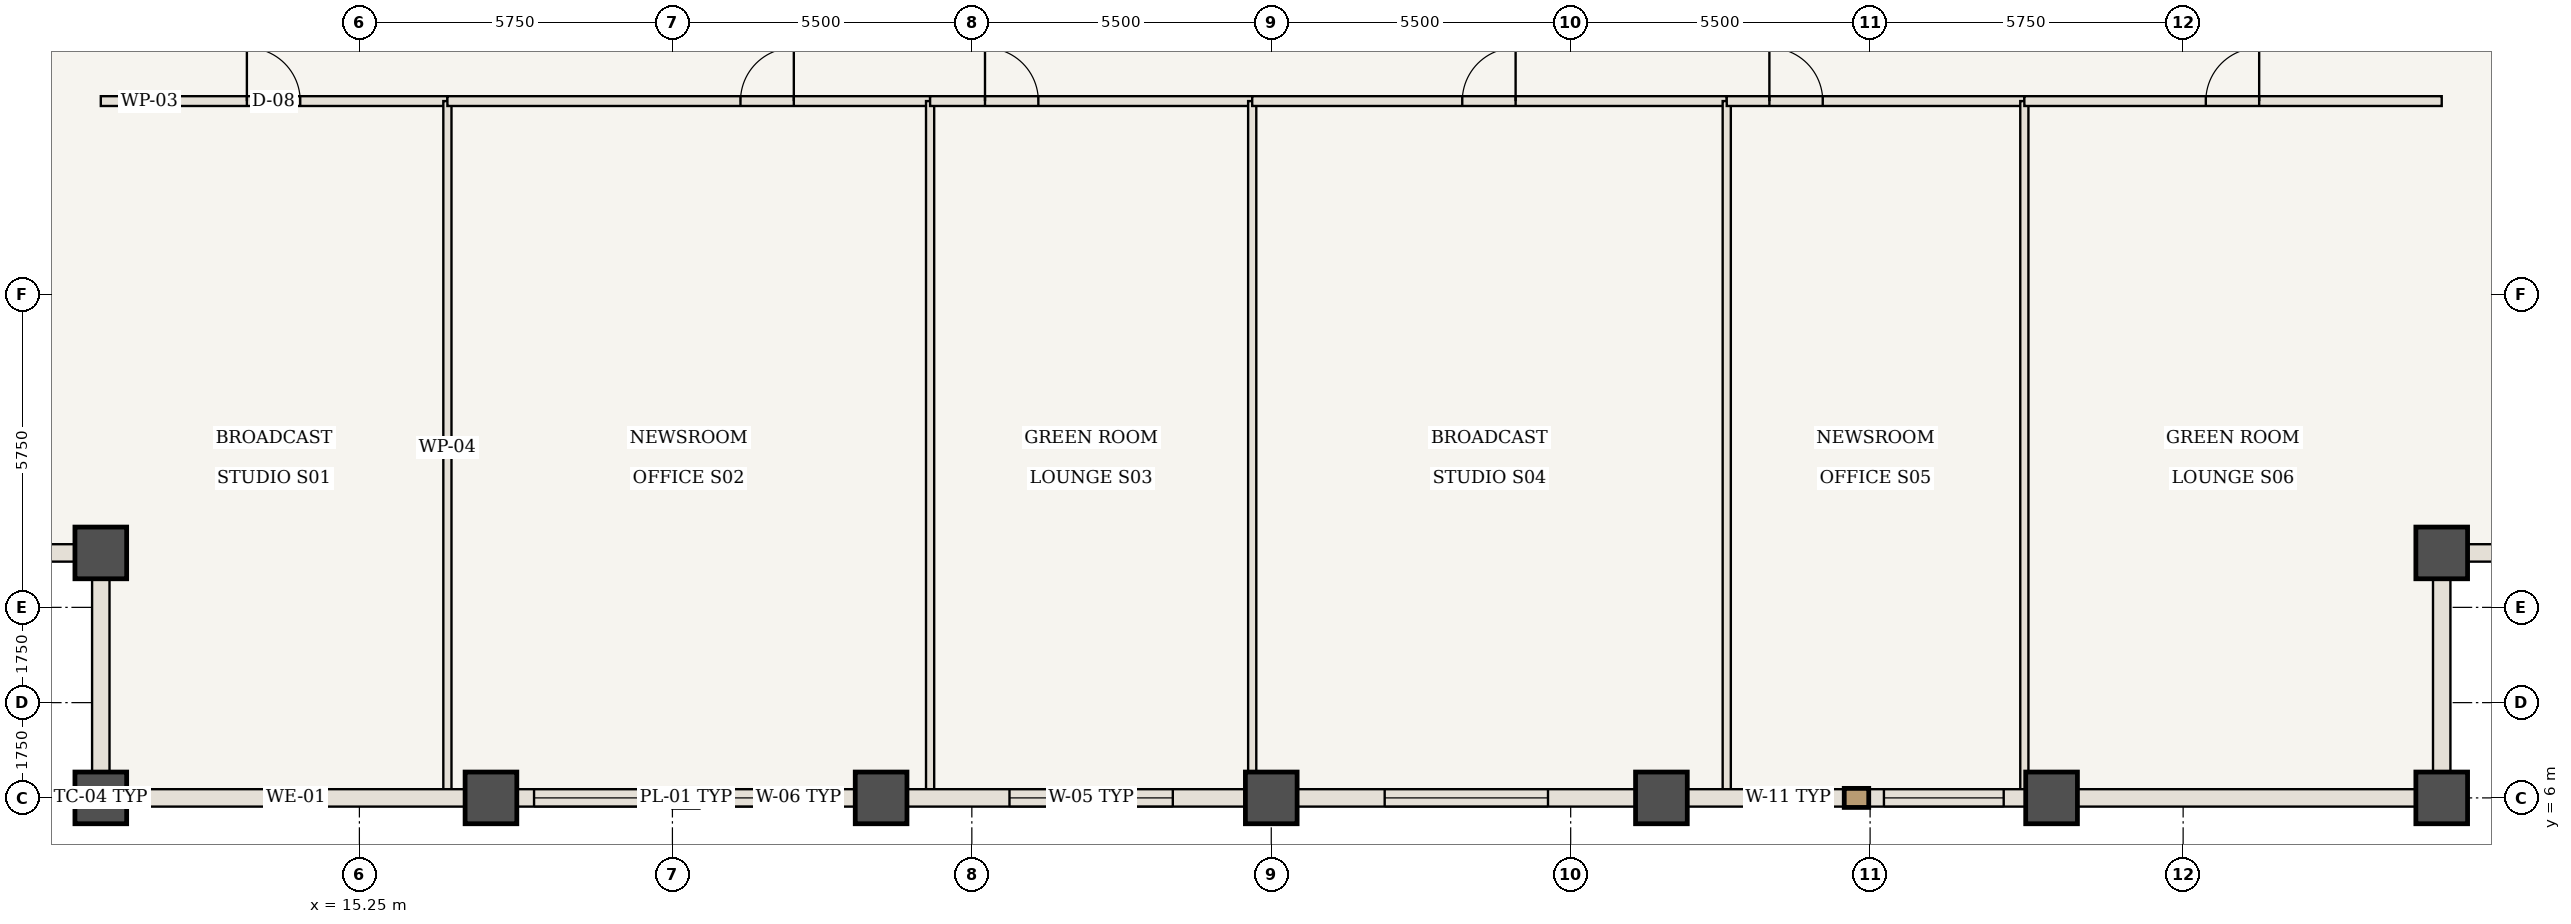
"""IFC4 building model, lengths in metres.
Left out: names, types, materials, properties, quantities, classifications, styles, units other than length and angle.
Written with IfcOpenShell. Run it as: python <this file> out.ifc"""

import sys

from ifc_helpers import new_model, si_unit, direction, frame, frame_2d, origin, origin_2d, place, context, subcontext, project, spatial, rectangle, extrude, element, fill, save


model = new_model("IFC4")
c1 = context("Model", 3, precision=1e-05, world=origin(), true_north=direction((0.0, 1.0)))
c2 = subcontext(c1, "Body", "Model", "MODEL_VIEW")
j1 = project(units=[si_unit("LENGTHUNIT", "METRE"), si_unit("PLANEANGLEUNIT", "RADIAN")], contexts=[c1])
p1 = place(None, origin())
s1 = spatial("IfcSite", under=j1, at=p1, CompositionType="ELEMENT")
p2 = place(p1, origin())
s2 = spatial("IfcBuilding", under=s1, at=p2, CompositionType="ELEMENT")
p3 = place(p2, frame((0.0, 0.0, 156.8)))
s3 = spatial("IfcBuildingStorey", under=s2, at=p3, CompositionType="ELEMENT", Elevation=156.8)
for number, where, z_axis, x_axis in (
    (1, (10.5, 6.0, 0.0), (0.0, 0.0, 1.0), (1.0, 0.0, 0.0)),
    (2, (10.5, 10.5, 0.0), (0.0, 0.0, 1.0), (1.0, 0.0, 0.0)),
    (3, (53.5, 6.0, 0.0), (0.0, 0.0, 1.0), (1.0, 0.0, 0.0)),
    (4, (53.5, 10.5, 0.0), (0.0, 0.0, 1.0), (1.0, 0.0, 0.0)),
    (5, (17.667, 6.0, 0.0), (0.0, 0.0, 1.0), (1.0, 0.0, 0.0)),
    (6, (24.833, 6.0, 0.0), (0.0, 0.0, 1.0), (1.0, 0.0, 0.0)),
    (7, (32.0, 6.0, 0.0), (0.0, 0.0, 1.0), (1.0, 0.0, 0.0)),
    (8, (39.167, 6.0, 0.0), (0.0, 0.0, 1.0), (1.0, 0.0, 0.0)),
    (9, (46.333, 6.0, 0.0), (0.0, 0.0, 1.0), (1.0, 0.0, 0.0)),
):
    element("IfcColumn", number, at=place(p3, frame(where, z_axis=z_axis, x_axis=x_axis)), inside=s3, PredefinedType="COLUMN", context=c2, shape_type="SweptSolid", body=[
        extrude(rectangle(XDim=0.95, YDim=0.95, at=origin_2d()), origin(), (0.0, 0.0, 1.0), 3.85),
    ])
p4 = place(p3, frame((10.5, 18.8, 0.0), z_axis=(0.0, 0.0, 1.0), x_axis=(1.0, 0.0, 0.0)))
e10 = element("IfcWall", 10, at=p4, inside=s3, PredefinedType="STANDARD", context=c2, shape_type="SweptSolid", body=[
    extrude(rectangle(XDim=6.367, YDim=0.18, at=frame_2d((3.183, 0.0))), origin(), (0.0, 0.0, 1.0), 3.685),
])
p5 = place(p4, frame((2.683, 0.0, 0.0)))
e11 = element("IfcOpeningElement", 11, at=p5, cuts=e10, PredefinedType="OPENING", context=c2, shape_type="SweptSolid", body=[
    extrude(rectangle(XDim=0.98, YDim=2.2, at=frame_2d((0.49, 1.1))), frame((0.0, 0.1, 0.0), z_axis=(0.0, -1.0, 0.0), x_axis=(1.0, 0.0, 0.0)), (0.0, 0.0, 1.0), 0.2),
])
p6 = place(p3, frame((16.867, 6.06, 0.0), z_axis=(0.0, 0.0, 1.0), x_axis=(0.0, 1.0, 0.0)))
e12 = element("IfcWall", 12, at=p6, inside=s3, PredefinedType="STANDARD", context=c2, shape_type="SweptSolid", body=[
    extrude(rectangle(XDim=12.74, YDim=0.15, at=frame_2d((6.37, 0.0))), origin(), (0.0, 0.0, 1.0), 3.685),
])
p7 = place(p3, frame((16.867, 18.8, 0.0), z_axis=(0.0, 0.0, 1.0), x_axis=(1.0, 0.0, 0.0)))
e13 = element("IfcWall", 13, at=p7, inside=s3, PredefinedType="STANDARD", context=c2, shape_type="SweptSolid", body=[
    extrude(rectangle(XDim=8.867, YDim=0.18, at=frame_2d((4.433, 0.0))), origin(), (0.0, 0.0, 1.0), 3.685),
])
p8 = place(p7, frame((5.383, 0.0, 0.0)))
e14 = element("IfcOpeningElement", 14, at=p8, cuts=e13, PredefinedType="OPENING", context=c2, shape_type="SweptSolid", body=[
    extrude(rectangle(XDim=0.98, YDim=2.2, at=frame_2d((0.49, 1.1))), frame((0.0, 0.1, 0.0), z_axis=(0.0, -1.0, 0.0), x_axis=(1.0, 0.0, 0.0)), (0.0, 0.0, 1.0), 0.2),
])
p9 = place(p3, frame((25.733, 6.06, 0.0), z_axis=(0.0, 0.0, 1.0), x_axis=(0.0, 1.0, 0.0)))
e15 = element("IfcWall", 15, at=p9, inside=s3, PredefinedType="STANDARD", context=c2, shape_type="SweptSolid", body=[
    extrude(rectangle(XDim=12.74, YDim=0.15, at=frame_2d((6.37, 0.0))), origin(), (0.0, 0.0, 1.0), 3.685),
])
p10 = place(p3, frame((25.733, 18.8, 0.0), z_axis=(0.0, 0.0, 1.0), x_axis=(1.0, 0.0, 0.0)))
e16 = element("IfcWall", 16, at=p10, inside=s3, PredefinedType="STANDARD", context=c2, shape_type="SweptSolid", body=[
    extrude(rectangle(XDim=5.917, YDim=0.18, at=frame_2d((2.958, 0.0))), origin(), (0.0, 0.0, 1.0), 3.685),
])
p11 = place(p10, frame((1.008, 0.0, 0.0)))
e17 = element("IfcOpeningElement", 17, at=p11, cuts=e16, PredefinedType="OPENING", context=c2, shape_type="SweptSolid", body=[
    extrude(rectangle(XDim=0.98, YDim=2.2, at=frame_2d((0.49, 1.1))), frame((0.0, 0.1, 0.0), z_axis=(0.0, -1.0, 0.0), x_axis=(1.0, 0.0, 0.0)), (0.0, 0.0, 1.0), 0.2),
])
p12 = place(p3, frame((31.65, 6.06, 0.0), z_axis=(0.0, 0.0, 1.0), x_axis=(0.0, 1.0, 0.0)))
e18 = element("IfcWall", 18, at=p12, inside=s3, PredefinedType="STANDARD", context=c2, shape_type="SweptSolid", body=[
    extrude(rectangle(XDim=12.74, YDim=0.15, at=frame_2d((6.37, 0.0))), origin(), (0.0, 0.0, 1.0), 3.685),
])
p13 = place(p3, frame((31.65, 18.8, 0.0), z_axis=(0.0, 0.0, 1.0), x_axis=(1.0, 0.0, 0.0)))
e19 = element("IfcWall", 19, at=p13, inside=s3, PredefinedType="STANDARD", context=c2, shape_type="SweptSolid", body=[
    extrude(rectangle(XDim=8.717, YDim=0.18, at=frame_2d((4.358, 0.0))), origin(), (0.0, 0.0, 1.0), 3.685),
])
p14 = place(p13, frame((3.858, 0.0, 0.0)))
e20 = element("IfcOpeningElement", 20, at=p14, cuts=e19, PredefinedType="OPENING", context=c2, shape_type="SweptSolid", body=[
    extrude(rectangle(XDim=0.98, YDim=2.2, at=frame_2d((0.49, 1.1))), frame((0.0, 0.1, 0.0), z_axis=(0.0, -1.0, 0.0), x_axis=(1.0, 0.0, 0.0)), (0.0, 0.0, 1.0), 0.2),
])
p15 = place(p3, frame((40.367, 6.06, 0.0), z_axis=(0.0, 0.0, 1.0), x_axis=(0.0, 1.0, 0.0)))
e21 = element("IfcWall", 21, at=p15, inside=s3, PredefinedType="STANDARD", context=c2, shape_type="SweptSolid", body=[
    extrude(rectangle(XDim=12.74, YDim=0.15, at=frame_2d((6.37, 0.0))), origin(), (0.0, 0.0, 1.0), 3.685),
])
p16 = place(p3, frame((40.367, 18.8, 0.0), z_axis=(0.0, 0.0, 1.0), x_axis=(1.0, 0.0, 0.0)))
e22 = element("IfcWall", 22, at=p16, inside=s3, PredefinedType="STANDARD", context=c2, shape_type="SweptSolid", body=[
    extrude(rectangle(XDim=5.467, YDim=0.18, at=frame_2d((2.733, 0.0))), origin(), (0.0, 0.0, 1.0), 3.685),
])
p17 = place(p16, frame((0.783, 0.0, 0.0)))
e23 = element("IfcOpeningElement", 23, at=p17, cuts=e22, PredefinedType="OPENING", context=c2, shape_type="SweptSolid", body=[
    extrude(rectangle(XDim=0.98, YDim=2.2, at=frame_2d((0.49, 1.1))), frame((0.0, 0.1, 0.0), z_axis=(0.0, -1.0, 0.0), x_axis=(1.0, 0.0, 0.0)), (0.0, 0.0, 1.0), 0.2),
])
p18 = place(p3, frame((45.833, 6.06, 0.0), z_axis=(0.0, 0.0, 1.0), x_axis=(0.0, 1.0, 0.0)))
e24 = element("IfcWall", 24, at=p18, inside=s3, PredefinedType="STANDARD", context=c2, shape_type="SweptSolid", body=[
    extrude(rectangle(XDim=12.74, YDim=0.15, at=frame_2d((6.37, 0.0))), origin(), (0.0, 0.0, 1.0), 3.685),
])
p19 = place(p3, frame((45.833, 18.8, 0.0), z_axis=(0.0, 0.0, 1.0), x_axis=(1.0, 0.0, 0.0)))
e25 = element("IfcWall", 25, at=p19, inside=s3, PredefinedType="STANDARD", context=c2, shape_type="SweptSolid", body=[
    extrude(rectangle(XDim=7.667, YDim=0.18, at=frame_2d((3.833, 0.0))), origin(), (0.0, 0.0, 1.0), 3.685),
])
p20 = place(p19, frame((3.333, 0.0, 0.0)))
e26 = element("IfcOpeningElement", 26, at=p20, cuts=e25, PredefinedType="OPENING", context=c2, shape_type="SweptSolid", body=[
    extrude(rectangle(XDim=0.98, YDim=2.2, at=frame_2d((0.49, 1.1))), frame((0.0, 0.1, 0.0), z_axis=(0.0, -1.0, 0.0), x_axis=(1.0, 0.0, 0.0)), (0.0, 0.0, 1.0), 0.2),
])
p21 = place(p3, frame((17.667, 6.0, 0.0), z_axis=(0.0, 0.0, 1.0), x_axis=(-1.0, 0.0, 0.0)))
e27 = element("IfcWall", 27, at=p21, inside=s3, PredefinedType="USERDEFINED", context=c2, shape_type="SweptSolid", body=[
    extrude(rectangle(XDim=7.167, YDim=0.32, at=frame_2d((3.583, 0.0))), origin(), (0.0, 0.0, 1.0), 2.885),
])
p22 = place(p3, frame((24.833, 6.0, 0.0), z_axis=(0.0, 0.0, 1.0), x_axis=(-1.0, 0.0, 0.0)))
e28 = element("IfcWall", 28, at=p22, inside=s3, PredefinedType="USERDEFINED", context=c2, shape_type="SweptSolid", body=[
    extrude(rectangle(XDim=7.167, YDim=0.32, at=frame_2d((3.583, 0.0))), origin(), (0.0, 0.0, 1.0), 2.885),
])
p23 = place(p22, frame((0.792, 0.0, 0.85)))
e29 = element("IfcOpeningElement", 29, at=p23, cuts=e28, PredefinedType="OPENING", context=c2, shape_type="SweptSolid", body=[
    extrude(rectangle(XDim=2.2, YDim=1.835, at=frame_2d((1.1, 0.917))), frame((0.0, 0.17, 0.0), z_axis=(0.0, -1.0, 0.0), x_axis=(1.0, 0.0, 0.0)), (0.0, 0.0, 1.0), 0.34),
])
p24 = place(p22, frame((4.175, 0.0, 0.85)))
e30 = element("IfcOpeningElement", 30, at=p24, cuts=e28, PredefinedType="OPENING", context=c2, shape_type="SweptSolid", body=[
    extrude(rectangle(XDim=2.2, YDim=1.835, at=frame_2d((1.1, 0.917))), frame((0.0, 0.17, 0.0), z_axis=(0.0, -1.0, 0.0), x_axis=(1.0, 0.0, 0.0)), (0.0, 0.0, 1.0), 0.34),
])
p25 = place(p3, frame((32.0, 6.0, 0.0), z_axis=(0.0, 0.0, 1.0), x_axis=(-1.0, 0.0, 0.0)))
e31 = element("IfcWall", 31, at=p25, inside=s3, PredefinedType="USERDEFINED", context=c2, shape_type="SweptSolid", body=[
    extrude(rectangle(XDim=7.167, YDim=0.32, at=frame_2d((3.583, 0.0))), origin(), (0.0, 0.0, 1.0), 2.885),
])
p26 = place(p25, frame((1.808, 0.0, 0.85)))
e32 = element("IfcOpeningElement", 32, at=p26, cuts=e31, PredefinedType="OPENING", context=c2, shape_type="SweptSolid", body=[
    extrude(rectangle(XDim=3.0, YDim=1.835, at=frame_2d((1.5, 0.917))), frame((0.0, 0.17, 0.0), z_axis=(0.0, -1.0, 0.0), x_axis=(1.0, 0.0, 0.0)), (0.0, 0.0, 1.0), 0.34),
])
p27 = place(p3, frame((39.167, 6.0, 0.0), z_axis=(0.0, 0.0, 1.0), x_axis=(-1.0, 0.0, 0.0)))
e33 = element("IfcWall", 33, at=p27, inside=s3, PredefinedType="USERDEFINED", context=c2, shape_type="SweptSolid", body=[
    extrude(rectangle(XDim=7.167, YDim=0.32, at=frame_2d((3.583, 0.0))), origin(), (0.0, 0.0, 1.0), 2.885),
])
p28 = place(p27, frame((2.083, 0.0, 0.85)))
e34 = element("IfcOpeningElement", 34, at=p28, cuts=e33, PredefinedType="OPENING", context=c2, shape_type="SweptSolid", body=[
    extrude(rectangle(XDim=3.0, YDim=1.835, at=frame_2d((1.5, 0.917))), frame((0.0, 0.17, 0.0), z_axis=(0.0, -1.0, 0.0), x_axis=(1.0, 0.0, 0.0)), (0.0, 0.0, 1.0), 0.34),
])
p29 = place(p3, frame((46.333, 6.0, 0.0), z_axis=(0.0, 0.0, 1.0), x_axis=(-1.0, 0.0, 0.0)))
e35 = element("IfcWall", 35, at=p29, inside=s3, PredefinedType="USERDEFINED", context=c2, shape_type="SweptSolid", body=[
    extrude(rectangle(XDim=7.167, YDim=0.32, at=frame_2d((3.583, 0.0))), origin(), (0.0, 0.0, 1.0), 2.885),
])
p30 = place(p29, frame((0.879, 0.0, 0.85)))
e36 = element("IfcOpeningElement", 36, at=p30, cuts=e35, PredefinedType="OPENING", context=c2, shape_type="SweptSolid", body=[
    extrude(rectangle(XDim=2.2, YDim=1.835, at=frame_2d((1.1, 0.917))), frame((0.0, 0.17, 0.0), z_axis=(0.0, -1.0, 0.0), x_axis=(1.0, 0.0, 0.0)), (0.0, 0.0, 1.0), 0.34),
])
p31 = place(p29, frame((4.038, 0.0, 0.85)))
e37 = element("IfcOpeningElement", 37, at=p31, cuts=e35, PredefinedType="OPENING", context=c2, shape_type="SweptSolid", body=[
    extrude(rectangle(XDim=1.6, YDim=1.835, at=frame_2d((0.8, 0.917))), frame((0.0, 0.17, 0.0), z_axis=(0.0, -1.0, 0.0), x_axis=(1.0, 0.0, 0.0)), (0.0, 0.0, 1.0), 0.34),
])
p32 = place(p3, frame((53.5, 6.0, 0.0), z_axis=(0.0, 0.0, 1.0), x_axis=(-1.0, 0.0, 0.0)))
e38 = element("IfcWall", 38, at=p32, inside=s3, PredefinedType="USERDEFINED", context=c2, shape_type="SweptSolid", body=[
    extrude(rectangle(XDim=7.167, YDim=0.32, at=frame_2d((3.583, 0.0))), origin(), (0.0, 0.0, 1.0), 2.885),
])
for number, where, z_axis, x_axis in (
    (39, (10.5, 6.0, 0.0), (0.0, 0.0, 1.0), (0.0, 1.0, 0.0)),
    (40, (10.5, 10.5, 0.0), (0.0, 0.0, 1.0), (-1.0, 0.0, 0.0)),
    (41, (53.5, 10.5, 0.0), (0.0, 0.0, 1.0), (0.0, -1.0, 0.0)),
    (42, (58.0, 10.5, 0.0), (0.0, 0.0, 1.0), (-1.0, 0.0, 0.0)),
):
    element("IfcWall", number, at=place(p3, frame(where, z_axis=z_axis, x_axis=x_axis)), inside=s3, PredefinedType="USERDEFINED", context=c2, shape_type="SweptSolid", body=[
        extrude(rectangle(XDim=4.5, YDim=0.32, at=frame_2d((2.25, 0.0))), origin(), (0.0, 0.0, 1.0), 2.885),
    ])
p33 = place(p5, origin())
e43 = element("IfcDoor", 43, at=p33, inside=s3, OperationType="SINGLE_SWING_LEFT", PredefinedType="DOOR", context=c2, shape_type="SweptSolid", body=[
    extrude(rectangle(XDim=0.98, YDim=2.2, at=frame_2d((0.49, 1.1))), frame((0.0, 0.025, 0.0), z_axis=(0.0, -1.0, 0.0), x_axis=(1.0, 0.0, 0.0)), (0.0, 0.0, 1.0), 0.05),
])
fill(e11, e43)
p34 = place(p8, origin())
e44 = element("IfcDoor", 44, at=p34, inside=s3, OperationType="SINGLE_SWING_RIGHT", PredefinedType="DOOR", context=c2, shape_type="SweptSolid", body=[
    extrude(rectangle(XDim=0.98, YDim=2.2, at=frame_2d((0.49, 1.1))), frame((0.0, 0.025, 0.0), z_axis=(0.0, -1.0, 0.0), x_axis=(1.0, 0.0, 0.0)), (0.0, 0.0, 1.0), 0.05),
])
fill(e14, e44)
p35 = place(p11, origin())
e45 = element("IfcDoor", 45, at=p35, inside=s3, OperationType="SINGLE_SWING_LEFT", PredefinedType="DOOR", context=c2, shape_type="SweptSolid", body=[
    extrude(rectangle(XDim=0.98, YDim=2.2, at=frame_2d((0.49, 1.1))), frame((0.0, 0.025, 0.0), z_axis=(0.0, -1.0, 0.0), x_axis=(1.0, 0.0, 0.0)), (0.0, 0.0, 1.0), 0.05),
])
fill(e17, e45)
p36 = place(p14, origin())
e46 = element("IfcDoor", 46, at=p36, inside=s3, OperationType="SINGLE_SWING_RIGHT", PredefinedType="DOOR", context=c2, shape_type="SweptSolid", body=[
    extrude(rectangle(XDim=0.98, YDim=2.2, at=frame_2d((0.49, 1.1))), frame((0.0, 0.025, 0.0), z_axis=(0.0, -1.0, 0.0), x_axis=(1.0, 0.0, 0.0)), (0.0, 0.0, 1.0), 0.05),
])
fill(e20, e46)
p37 = place(p17, origin())
e47 = element("IfcDoor", 47, at=p37, inside=s3, OperationType="SINGLE_SWING_LEFT", PredefinedType="DOOR", context=c2, shape_type="SweptSolid", body=[
    extrude(rectangle(XDim=0.98, YDim=2.2, at=frame_2d((0.49, 1.1))), frame((0.0, 0.025, 0.0), z_axis=(0.0, -1.0, 0.0), x_axis=(1.0, 0.0, 0.0)), (0.0, 0.0, 1.0), 0.05),
])
fill(e23, e47)
p38 = place(p20, origin())
e48 = element("IfcDoor", 48, at=p38, inside=s3, OperationType="SINGLE_SWING_RIGHT", PredefinedType="DOOR", context=c2, shape_type="SweptSolid", body=[
    extrude(rectangle(XDim=0.98, YDim=2.2, at=frame_2d((0.49, 1.1))), frame((0.0, 0.025, 0.0), z_axis=(0.0, -1.0, 0.0), x_axis=(1.0, 0.0, 0.0)), (0.0, 0.0, 1.0), 0.05),
])
fill(e26, e48)
p39 = place(p23, origin())
e49 = element("IfcWindow", 49, at=p39, inside=s3, PartitioningType="SINGLE_PANEL", PredefinedType="WINDOW", context=c2, shape_type="SweptSolid", body=[
    extrude(rectangle(XDim=2.2, YDim=1.835, at=frame_2d((1.1, 0.917))), frame((0.0, 0.03, 0.0), z_axis=(0.0, -1.0, 0.0), x_axis=(1.0, 0.0, 0.0)), (0.0, 0.0, 1.0), 0.06),
])
fill(e29, e49)
p40 = place(p24, origin())
e50 = element("IfcWindow", 50, at=p40, inside=s3, PartitioningType="SINGLE_PANEL", PredefinedType="WINDOW", context=c2, shape_type="SweptSolid", body=[
    extrude(rectangle(XDim=2.2, YDim=1.835, at=frame_2d((1.1, 0.917))), frame((0.0, 0.03, 0.0), z_axis=(0.0, -1.0, 0.0), x_axis=(1.0, 0.0, 0.0)), (0.0, 0.0, 1.0), 0.06),
])
fill(e30, e50)
p41 = place(p26, origin())
e51 = element("IfcWindow", 51, at=p41, inside=s3, PartitioningType="SINGLE_PANEL", PredefinedType="WINDOW", context=c2, shape_type="SweptSolid", body=[
    extrude(rectangle(XDim=3.0, YDim=1.835, at=frame_2d((1.5, 0.917))), frame((0.0, 0.03, 0.0), z_axis=(0.0, -1.0, 0.0), x_axis=(1.0, 0.0, 0.0)), (0.0, 0.0, 1.0), 0.06),
])
fill(e32, e51)
p42 = place(p28, origin())
e52 = element("IfcWindow", 52, at=p42, inside=s3, PartitioningType="SINGLE_PANEL", PredefinedType="WINDOW", context=c2, shape_type="SweptSolid", body=[
    extrude(rectangle(XDim=3.0, YDim=1.835, at=frame_2d((1.5, 0.917))), frame((0.0, 0.03, 0.0), z_axis=(0.0, -1.0, 0.0), x_axis=(1.0, 0.0, 0.0)), (0.0, 0.0, 1.0), 0.06),
])
fill(e34, e52)
p43 = place(p30, origin())
e53 = element("IfcWindow", 53, at=p43, inside=s3, PartitioningType="SINGLE_PANEL", PredefinedType="WINDOW", context=c2, shape_type="SweptSolid", body=[
    extrude(rectangle(XDim=2.2, YDim=1.835, at=frame_2d((1.1, 0.917))), frame((0.0, 0.03, 0.0), z_axis=(0.0, -1.0, 0.0), x_axis=(1.0, 0.0, 0.0)), (0.0, 0.0, 1.0), 0.06),
])
fill(e36, e53)
p44 = place(p31, origin())
e54 = element("IfcWindow", 54, at=p44, inside=s3, PartitioningType="SINGLE_PANEL", PredefinedType="WINDOW", context=c2, shape_type="SweptSolid", body=[
    extrude(rectangle(XDim=1.6, YDim=1.835, at=frame_2d((0.8, 0.917))), frame((0.0, 0.03, 0.0), z_axis=(0.0, -1.0, 0.0), x_axis=(1.0, 0.0, 0.0)), (0.0, 0.0, 1.0), 0.06),
])
fill(e37, e54)
save(model, sys.argv[1])
